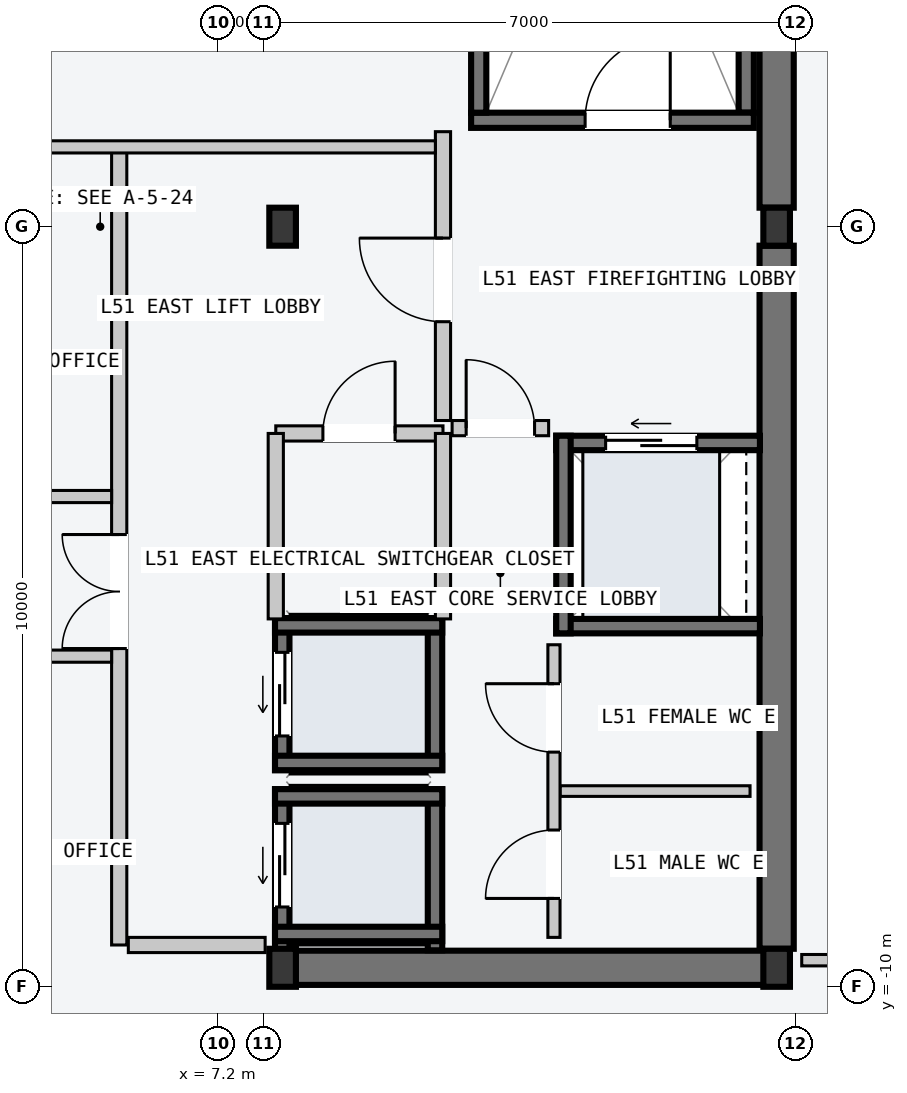
"""IFC4 building model, lengths in metres.
Left out: names, types, materials, properties, quantities, classifications, styles, units other than length and angle.
Written with IfcOpenShell. Run it as: python <this file> out.ifc"""

import sys

from ifc_helpers import new_model, si_unit, direction, frame, frame_2d, origin, origin_2d, place, context, subcontext, project, spatial, rectangle, i_section, extrude, element, fill, save


model = new_model("IFC4")
c1 = context("Model", 3, precision=1e-05, world=origin(), true_north=direction((0.0, 1.0)))
c2 = subcontext(c1, "Body", "Model", "MODEL_VIEW")
j1 = project(units=[si_unit("LENGTHUNIT", "METRE"), si_unit("PLANEANGLEUNIT", "RADIAN")], contexts=[c1])
p1 = place(None, origin())
s1 = spatial("IfcSite", under=j1, at=p1, CompositionType="ELEMENT")
p2 = place(p1, origin())
s2 = spatial("IfcBuilding", under=s1, at=p2, CompositionType="ELEMENT")
p3 = place(p2, frame((0.0, 0.0, 194.7)))
s3 = spatial("IfcBuildingStorey", under=s2, at=p3, CompositionType="ELEMENT", Elevation=194.7)
p4 = place(p3, frame((8.07, -9.75, -0.2), z_axis=(0.0, 0.0, 1.0), x_axis=(1.0, 0.0, 0.0)))
e1 = element("IfcWall", 1, at=p4, inside=s3, PredefinedType="SHEAR", context=c2, shape_type="SweptSolid", body=[
    extrude(rectangle(XDim=6.46, YDim=0.45, at=frame_2d((3.23, 0.0))), origin(), (0.0, 0.0, 1.0), 3.6),
])
for number, where, z_axis, x_axis in (
    (2, (14.55, -9.5, -0.2), (0.0, 0.0, 1.0), (0.0, 1.0, 0.0)),
    (3, (14.55, 0.25, -0.2), (0.0, 0.0, 1.0), (0.0, 1.0, 0.0)),
):
    element("IfcWall", number, at=place(p3, frame(where, z_axis=z_axis, x_axis=x_axis)), inside=s3, PredefinedType="SHEAR", context=c2, shape_type="SweptSolid", body=[
        extrude(rectangle(XDim=9.25, YDim=0.45, at=frame_2d((4.625, 0.0))), origin(), (0.0, 0.0, 1.0), 3.6),
    ])
p5 = place(p3, frame((14.15, 1.5, -0.2), z_axis=(0.0, 0.0, 1.0), x_axis=(0.0, 1.0, 0.0)))
e4 = element("IfcWall", 4, at=p5, inside=s3, PredefinedType="SOLIDWALL", context=c2, shape_type="SweptSolid", body=[
    extrude(rectangle(XDim=7.8, YDim=0.2, at=frame_2d((3.9, 0.0))), origin(), (0.0, 0.0, 1.0), 3.6),
])
p6 = place(p3, frame((10.53, 1.4, -0.2), z_axis=(0.0, 0.0, 1.0), x_axis=(1.0, 0.0, 0.0)))
e5 = element("IfcWall", 5, at=p6, inside=s3, PredefinedType="SOLIDWALL", context=c2, shape_type="SweptSolid", body=[
    extrude(rectangle(XDim=3.72, YDim=0.2, at=frame_2d((1.86, 0.0))), origin(), (0.0, 0.0, 1.0), 3.6),
])
p7 = place(p6, frame((1.5, 0.0, 0.2)))
e6 = element("IfcOpeningElement", 6, at=p7, cuts=e5, PredefinedType="OPENING", context=c2, shape_type="SweptSolid", body=[
    extrude(rectangle(XDim=1.12, YDim=2.18, at=frame_2d((0.56, 1.09))), frame((0.0, 0.11, 0.0), z_axis=(0.0, -1.0, 0.0), x_axis=(1.0, 0.0, 0.0)), (0.0, 0.0, 1.0), 0.22),
])
p8 = place(p3, frame((10.63, 1.5, -0.2), z_axis=(0.0, 0.0, 1.0), x_axis=(0.0, 1.0, 0.0)))
e7 = element("IfcWall", 7, at=p8, inside=s3, PredefinedType="SOLIDWALL", context=c2, shape_type="SweptSolid", body=[
    extrude(rectangle(XDim=7.8, YDim=0.2, at=frame_2d((3.9, 0.0))), origin(), (0.0, 0.0, 1.0), 3.6),
])
for number, where, z_axis, x_axis in (
    (8, (8.05, -9.75, 0.0), (0.0, 0.0, 1.0), (1.0, 0.0, 0.0)),
    (9, (8.05, 0.0, 0.0), (0.0, 0.0, 1.0), (1.0, 0.0, 0.0)),
    (10, (14.55, -9.75, 0.0), (0.0, 0.0, 1.0), (1.0, 0.0, 0.0)),
    (11, (14.55, 0.0, 0.0), (0.0, 0.0, 1.0), (1.0, 0.0, 0.0)),
):
    element("IfcColumn", number, at=place(p3, frame(where, z_axis=z_axis, x_axis=x_axis)), inside=s3, PredefinedType="COLUMN", context=c2, shape_type="SweptSolid", body=[
        extrude(i_section(OverallWidth=0.35, OverallDepth=0.5, WebThickness=0.02, FlangeThickness=0.032, at=origin_2d()), origin(), (0.0, 0.0, 1.0), 3.6),
    ])
p9 = place(p3, frame((8.045, -9.52, -0.2), z_axis=(0.0, 0.0, 1.0), x_axis=(0.0, 1.0, 0.0)))
e12 = element("IfcWall", 12, at=p9, inside=s3, PredefinedType="SOLIDWALL", context=c2, shape_type="SweptSolid", body=[
    extrude(rectangle(XDim=2.12, YDim=0.19, at=frame_2d((1.06, 0.0))), origin(), (0.0, 0.0, 1.0), 3.6),
])
p10 = place(p9, frame((0.57, 0.0, 0.2)))
e13 = element("IfcOpeningElement", 13, at=p10, cuts=e12, PredefinedType="OPENING", context=c2, shape_type="SweptSolid", body=[
    extrude(rectangle(XDim=1.1, YDim=2.2, at=frame_2d((0.55, 1.1))), frame((0.0, 0.105, 0.0), z_axis=(0.0, -1.0, 0.0), x_axis=(1.0, 0.0, 0.0)), (0.0, 0.0, 1.0), 0.21),
])
p11 = place(p3, frame((10.055, -9.52, -0.2), z_axis=(0.0, 0.0, 1.0), x_axis=(0.0, 1.0, 0.0)))
e14 = element("IfcWall", 14, at=p11, inside=s3, PredefinedType="SOLIDWALL", context=c2, shape_type="SweptSolid", body=[
    extrude(rectangle(XDim=2.12, YDim=0.19, at=frame_2d((1.06, 0.0))), origin(), (0.0, 0.0, 1.0), 3.6),
])
for number, where, z_axis, x_axis in (
    (15, (7.95, -7.495, -0.2), (0.0, 0.0, 1.0), (1.0, 0.0, 0.0)),
    (16, (7.95, -9.305, -0.2), (0.0, 0.0, 1.0), (1.0, 0.0, 0.0)),
):
    element("IfcWall", number, at=place(p3, frame(where, z_axis=z_axis, x_axis=x_axis)), inside=s3, PredefinedType="SOLIDWALL", context=c2, shape_type="SweptSolid", body=[
        extrude(rectangle(XDim=2.2, YDim=0.19, at=frame_2d((1.1, 0.0))), origin(), (0.0, 0.0, 1.0), 3.6),
    ])
p12 = place(p3, frame((8.045, -7.15, -0.2), z_axis=(0.0, 0.0, 1.0), x_axis=(0.0, 1.0, 0.0)))
e17 = element("IfcWall", 17, at=p12, inside=s3, PredefinedType="SOLIDWALL", context=c2, shape_type="SweptSolid", body=[
    extrude(rectangle(XDim=2.0, YDim=0.19, at=frame_2d((1.0, 0.0))), origin(), (0.0, 0.0, 1.0), 3.6),
])
p13 = place(p12, frame((0.45, 0.0, 0.2)))
e18 = element("IfcOpeningElement", 18, at=p13, cuts=e17, PredefinedType="OPENING", context=c2, shape_type="SweptSolid", body=[
    extrude(rectangle(XDim=1.1, YDim=2.2, at=frame_2d((0.55, 1.1))), frame((0.0, 0.105, 0.0), z_axis=(0.0, -1.0, 0.0), x_axis=(1.0, 0.0, 0.0)), (0.0, 0.0, 1.0), 0.21),
])
p14 = place(p3, frame((10.055, -7.15, -0.2), z_axis=(0.0, 0.0, 1.0), x_axis=(0.0, 1.0, 0.0)))
e19 = element("IfcWall", 19, at=p14, inside=s3, PredefinedType="SOLIDWALL", context=c2, shape_type="SweptSolid", body=[
    extrude(rectangle(XDim=2.0, YDim=0.19, at=frame_2d((1.0, 0.0))), origin(), (0.0, 0.0, 1.0), 3.6),
])
for number, where, z_axis, x_axis in (
    (20, (7.95, -5.245, -0.2), (0.0, 0.0, 1.0), (1.0, 0.0, 0.0)),
    (21, (7.95, -7.055, -0.2), (0.0, 0.0, 1.0), (1.0, 0.0, 0.0)),
):
    element("IfcWall", number, at=place(p3, frame(where, z_axis=z_axis, x_axis=x_axis)), inside=s3, PredefinedType="SOLIDWALL", context=c2, shape_type="SweptSolid", body=[
        extrude(rectangle(XDim=2.2, YDim=0.19, at=frame_2d((1.1, 0.0))), origin(), (0.0, 0.0, 1.0), 3.6),
    ])
p15 = place(p3, frame((11.65, -2.845, -0.2), z_axis=(0.0, 0.0, 1.0), x_axis=(1.0, 0.0, 0.0)))
e22 = element("IfcWall", 22, at=p15, inside=s3, PredefinedType="SOLIDWALL", context=c2, shape_type="SweptSolid", body=[
    extrude(rectangle(XDim=2.68, YDim=0.19, at=frame_2d((1.34, 0.0))), origin(), (0.0, 0.0, 1.0), 3.6),
])
p16 = place(p15, frame((0.65, 0.0, 0.2)))
e23 = element("IfcOpeningElement", 23, at=p16, cuts=e22, PredefinedType="OPENING", context=c2, shape_type="SweptSolid", body=[
    extrude(rectangle(XDim=1.2, YDim=2.2, at=frame_2d((0.6, 1.1))), frame((0.0, 0.105, 0.0), z_axis=(0.0, -1.0, 0.0), x_axis=(1.0, 0.0, 0.0)), (0.0, 0.0, 1.0), 0.21),
])
p17 = place(p3, frame((11.65, -5.255, -0.2), z_axis=(0.0, 0.0, 1.0), x_axis=(1.0, 0.0, 0.0)))
e24 = element("IfcWall", 24, at=p17, inside=s3, PredefinedType="SOLIDWALL", context=c2, shape_type="SweptSolid", body=[
    extrude(rectangle(XDim=2.68, YDim=0.19, at=frame_2d((1.34, 0.0))), origin(), (0.0, 0.0, 1.0), 3.6),
])
p18 = place(p3, frame((11.745, -5.35, -0.2), z_axis=(0.0, 0.0, 1.0), x_axis=(0.0, 1.0, 0.0)))
e25 = element("IfcWall", 25, at=p18, inside=s3, PredefinedType="SOLIDWALL", context=c2, shape_type="SweptSolid", body=[
    extrude(rectangle(XDim=2.6, YDim=0.19, at=frame_2d((1.3, 0.0))), origin(), (0.0, 0.0, 1.0), 3.6),
])
p19 = place(p3, frame((5.9, -9.45, 0.0), z_axis=(0.0, 0.0, 1.0), x_axis=(0.0, 1.0, 0.0)))
e26 = element("IfcWall", 26, at=p19, inside=s3, PredefinedType="PARTITIONING", context=c2, shape_type="SweptSolid", body=[
    extrude(rectangle(XDim=10.5, YDim=0.2, at=frame_2d((5.25, 0.0))), origin(), (0.0, 0.0, 1.0), 3.4),
])
p20 = place(p19, frame((3.9, 0.0, 0.0)))
e27 = element("IfcOpeningElement", 27, at=p20, cuts=e26, PredefinedType="OPENING", context=c2, shape_type="SweptSolid", body=[
    extrude(rectangle(XDim=1.5, YDim=2.2, at=frame_2d((0.75, 1.1))), frame((0.0, 0.11, 0.0), z_axis=(0.0, -1.0, 0.0), x_axis=(1.0, 0.0, 0.0)), (0.0, 0.0, 1.0), 0.22),
])
p21 = place(p3, frame((6.02, -9.45, 0.0), z_axis=(0.0, 0.0, 1.0), x_axis=(1.0, 0.0, 0.0)))
e28 = element("IfcWall", 28, at=p21, inside=s3, PredefinedType="PARTITIONING", context=c2, shape_type="SweptSolid", body=[
    extrude(rectangle(XDim=1.8, YDim=0.2, at=frame_2d((0.9, 0.0))), origin(), (0.0, 0.0, 1.0), 3.4),
])
p22 = place(p3, frame((10.16, -2.55, 0.0), z_axis=(0.0, 0.0, 1.0), x_axis=(0.0, 1.0, 0.0)))
e29 = element("IfcWall", 29, at=p22, inside=s3, PredefinedType="PARTITIONING", context=c2, shape_type="SweptSolid", body=[
    extrude(rectangle(XDim=3.8, YDim=0.2, at=frame_2d((1.9, 0.0))), origin(), (0.0, 0.0, 1.0), 3.4),
])
p23 = place(p22, frame((1.3, 0.0, 0.0)))
e30 = element("IfcOpeningElement", 30, at=p23, cuts=e29, PredefinedType="OPENING", context=c2, shape_type="SweptSolid", body=[
    extrude(rectangle(XDim=1.1, YDim=2.15, at=frame_2d((0.55, 1.075))), frame((0.0, 0.11, 0.0), z_axis=(0.0, -1.0, 0.0), x_axis=(1.0, 0.0, 0.0)), (0.0, 0.0, 1.0), 0.22),
])
p24 = place(p3, frame((10.28, -2.65, 0.0), z_axis=(0.0, 0.0, 1.0), x_axis=(1.0, 0.0, 0.0)))
e31 = element("IfcWall", 31, at=p24, inside=s3, PredefinedType="PARTITIONING", context=c2, shape_type="SweptSolid", body=[
    extrude(rectangle(XDim=1.27, YDim=0.2, at=frame_2d((0.635, 0.0))), origin(), (0.0, 0.0, 1.0), 3.4),
])
p25 = place(p24, frame((0.185, 0.0, 0.0)))
e32 = element("IfcOpeningElement", 32, at=p25, cuts=e31, PredefinedType="OPENING", context=c2, shape_type="SweptSolid", body=[
    extrude(rectangle(XDim=0.9, YDim=2.15, at=frame_2d((0.45, 1.075))), frame((0.0, 0.11, 0.0), z_axis=(0.0, -1.0, 0.0), x_axis=(1.0, 0.0, 0.0)), (0.0, 0.0, 1.0), 0.22),
])
p26 = place(p3, frame((7.96, -2.72, 0.0), z_axis=(0.0, 0.0, 1.0), x_axis=(1.0, 0.0, 0.0)))
e33 = element("IfcWall", 33, at=p26, inside=s3, PredefinedType="PARTITIONING", context=c2, shape_type="SweptSolid", body=[
    extrude(rectangle(XDim=2.2, YDim=0.2, at=frame_2d((1.1, 0.0))), origin(), (0.0, 0.0, 1.0), 3.4),
])
p27 = place(p26, frame((0.62, 0.0, 0.0)))
e34 = element("IfcOpeningElement", 34, at=p27, cuts=e33, PredefinedType="OPENING", context=c2, shape_type="SweptSolid", body=[
    extrude(rectangle(XDim=0.95, YDim=2.1, at=frame_2d((0.475, 1.05))), frame((0.0, 0.11, 0.0), z_axis=(0.0, -1.0, 0.0), x_axis=(1.0, 0.0, 0.0)), (0.0, 0.0, 1.0), 0.22),
])
for number, where, z_axis, x_axis in (
    (35, (7.96, -5.16, 0.0), (0.0, 0.0, 1.0), (0.0, 1.0, 0.0)),
    (36, (10.16, -5.16, 0.0), (0.0, 0.0, 1.0), (0.0, 1.0, 0.0)),
):
    element("IfcWall", number, at=place(p3, frame(where, z_axis=z_axis, x_axis=x_axis)), inside=s3, PredefinedType="PARTITIONING", context=c2, shape_type="SweptSolid", body=[
        extrude(rectangle(XDim=2.44, YDim=0.2, at=frame_2d((1.22, 0.0))), origin(), (0.0, 0.0, 1.0), 3.4),
    ])
p28 = place(p3, frame((11.7, -7.425, 0.0), z_axis=(0.0, 0.0, 1.0), x_axis=(1.0, 0.0, 0.0)))
e37 = element("IfcWall", 37, at=p28, inside=s3, PredefinedType="PARTITIONING", context=c2, shape_type="SweptSolid", body=[
    extrude(rectangle(XDim=2.5, YDim=0.14, at=frame_2d((1.25, 0.0))), origin(), (0.0, 0.0, 1.0), 3.4),
])
p29 = place(p3, frame((11.62, -9.35, 0.0), z_axis=(0.0, 0.0, 1.0), x_axis=(0.0, 1.0, 0.0)))
e38 = element("IfcWall", 38, at=p29, inside=s3, PredefinedType="PARTITIONING", context=c2, shape_type="SweptSolid", body=[
    extrude(rectangle(XDim=3.85, YDim=0.16, at=frame_2d((1.925, 0.0))), origin(), (0.0, 0.0, 1.0), 3.4),
])
p30 = place(p29, frame((0.512, 0.0, 0.0)))
e39 = element("IfcOpeningElement", 39, at=p30, cuts=e38, PredefinedType="OPENING", context=c2, shape_type="SweptSolid", body=[
    extrude(rectangle(XDim=0.9, YDim=2.15, at=frame_2d((0.45, 1.075))), frame((0.0, 0.09, 0.0), z_axis=(0.0, -1.0, 0.0), x_axis=(1.0, 0.0, 0.0)), (0.0, 0.0, 1.0), 0.18),
])
p31 = place(p29, frame((2.438, 0.0, 0.0)))
e40 = element("IfcOpeningElement", 40, at=p31, cuts=e38, PredefinedType="OPENING", context=c2, shape_type="SweptSolid", body=[
    extrude(rectangle(XDim=0.9, YDim=2.15, at=frame_2d((0.45, 1.075))), frame((0.0, 0.09, 0.0), z_axis=(0.0, -1.0, 0.0), x_axis=(1.0, 0.0, 0.0)), (0.0, 0.0, 1.0), 0.18),
])
p32 = place(p3, frame((1.26, 1.05, 0.0), z_axis=(0.0, 0.0, 1.0), x_axis=(1.0, 0.0, 0.0)))
e41 = element("IfcWall", 41, at=p32, inside=s3, PredefinedType="PARTITIONING", context=c2, shape_type="SweptSolid", body=[
    extrude(rectangle(XDim=8.8, YDim=0.16, at=frame_2d((4.4, 0.0))), origin(), (0.0, 0.0, 1.0), 3.4),
])
for number, where, z_axis, x_axis in (
    (42, (1.26, -3.55, 0.0), (0.0, 0.0, 1.0), (1.0, 0.0, 0.0)),
    (43, (1.26, -5.65, 0.0), (0.0, 0.0, 1.0), (1.0, 0.0, 0.0)),
):
    element("IfcWall", number, at=place(p3, frame(where, z_axis=z_axis, x_axis=x_axis)), inside=s3, PredefinedType="PARTITIONING", context=c2, shape_type="SweptSolid", body=[
        extrude(rectangle(XDim=4.54, YDim=0.16, at=frame_2d((2.27, 0.0))), origin(), (0.0, 0.0, 1.0), 3.4),
    ])
p33 = place(p3, frame((14.88, -9.65, 0.0), z_axis=(0.0, 0.0, 1.0), x_axis=(1.0, 0.0, 0.0)))
e44 = element("IfcWall", 44, at=p33, inside=s3, PredefinedType="PARTITIONING", context=c2, shape_type="SweptSolid", body=[
    extrude(rectangle(XDim=5.68, YDim=0.15, at=frame_2d((2.84, 0.0))), origin(), (0.0, 0.0, 1.0), 2.75),
])
p34 = place(p33, frame((2.36, 0.0, 0.0)))
e45 = element("IfcOpeningElement", 45, at=p34, cuts=e44, PredefinedType="OPENING", context=c2, shape_type="SweptSolid", body=[
    extrude(rectangle(XDim=0.96, YDim=2.18, at=frame_2d((0.48, 1.09))), frame((0.0, 0.085, 0.0), z_axis=(0.0, -1.0, 0.0), x_axis=(1.0, 0.0, 0.0)), (0.0, 0.0, 1.0), 0.17),
])
p35 = place(p7, origin())
e46 = element("IfcDoor", 46, at=p35, inside=s3, OperationType="SINGLE_SWING_RIGHT", PredefinedType="DOOR", context=c2, shape_type="SweptSolid", body=[
    extrude(rectangle(XDim=1.12, YDim=2.18, at=frame_2d((0.56, 1.09))), frame((0.0, 0.025, 0.0), z_axis=(0.0, -1.0, 0.0), x_axis=(1.0, 0.0, 0.0)), (0.0, 0.0, 1.0), 0.05),
])
fill(e6, e46)
p36 = place(p10, origin())
e47 = element("IfcDoor", 47, at=p36, inside=s3, OperationType="SLIDING_TO_LEFT", PredefinedType="DOOR", context=c2, shape_type="SweptSolid", body=[
    extrude(rectangle(XDim=1.1, YDim=2.2, at=frame_2d((0.55, 1.1))), frame((0.0, 0.025, 0.0), z_axis=(0.0, -1.0, 0.0), x_axis=(1.0, 0.0, 0.0)), (0.0, 0.0, 1.0), 0.05),
])
fill(e13, e47)
p37 = place(p13, origin())
e48 = element("IfcDoor", 48, at=p37, inside=s3, OperationType="SLIDING_TO_LEFT", PredefinedType="DOOR", context=c2, shape_type="SweptSolid", body=[
    extrude(rectangle(XDim=1.1, YDim=2.2, at=frame_2d((0.55, 1.1))), frame((0.0, 0.025, 0.0), z_axis=(0.0, -1.0, 0.0), x_axis=(1.0, 0.0, 0.0)), (0.0, 0.0, 1.0), 0.05),
])
fill(e18, e48)
p38 = place(p16, origin())
e49 = element("IfcDoor", 49, at=p38, inside=s3, OperationType="SLIDING_TO_LEFT", PredefinedType="DOOR", context=c2, shape_type="SweptSolid", body=[
    extrude(rectangle(XDim=1.2, YDim=2.2, at=frame_2d((0.6, 1.1))), frame((0.0, 0.025, 0.0), z_axis=(0.0, -1.0, 0.0), x_axis=(1.0, 0.0, 0.0)), (0.0, 0.0, 1.0), 0.05),
])
fill(e23, e49)
p39 = place(p20, origin())
e50 = element("IfcDoor", 50, at=p39, inside=s3, OperationType="DOUBLE_DOOR_SINGLE_SWING", PredefinedType="DOOR", context=c2, shape_type="SweptSolid", body=[
    extrude(rectangle(XDim=1.5, YDim=2.2, at=frame_2d((0.75, 1.1))), frame((0.0, 0.025, 0.0), z_axis=(0.0, -1.0, 0.0), x_axis=(1.0, 0.0, 0.0)), (0.0, 0.0, 1.0), 0.05),
])
fill(e27, e50)
p40 = place(p23, origin())
e51 = element("IfcDoor", 51, at=p40, inside=s3, OperationType="SINGLE_SWING_RIGHT", PredefinedType="DOOR", context=c2, shape_type="SweptSolid", body=[
    extrude(rectangle(XDim=1.1, YDim=2.15, at=frame_2d((0.55, 1.075))), frame((0.0, 0.025, 0.0), z_axis=(0.0, -1.0, 0.0), x_axis=(1.0, 0.0, 0.0)), (0.0, 0.0, 1.0), 0.05),
])
fill(e30, e51)
p41 = place(p25, origin())
e52 = element("IfcDoor", 52, at=p41, inside=s3, OperationType="SINGLE_SWING_LEFT", PredefinedType="DOOR", context=c2, shape_type="SweptSolid", body=[
    extrude(rectangle(XDim=0.9, YDim=2.15, at=frame_2d((0.45, 1.075))), frame((0.0, 0.025, 0.0), z_axis=(0.0, -1.0, 0.0), x_axis=(1.0, 0.0, 0.0)), (0.0, 0.0, 1.0), 0.05),
])
fill(e32, e52)
p42 = place(p27, origin())
e53 = element("IfcDoor", 53, at=p42, inside=s3, OperationType="SINGLE_SWING_RIGHT", PredefinedType="DOOR", context=c2, shape_type="SweptSolid", body=[
    extrude(rectangle(XDim=0.95, YDim=2.1, at=frame_2d((0.475, 1.05))), frame((0.0, 0.025, 0.0), z_axis=(0.0, -1.0, 0.0), x_axis=(1.0, 0.0, 0.0)), (0.0, 0.0, 1.0), 0.05),
])
fill(e34, e53)
p43 = place(p30, origin())
e54 = element("IfcDoor", 54, at=p43, inside=s3, OperationType="SINGLE_SWING_LEFT", PredefinedType="DOOR", context=c2, shape_type="SweptSolid", body=[
    extrude(rectangle(XDim=0.9, YDim=2.15, at=frame_2d((0.45, 1.075))), frame((0.0, 0.025, 0.0), z_axis=(0.0, -1.0, 0.0), x_axis=(1.0, 0.0, 0.0)), (0.0, 0.0, 1.0), 0.05),
])
fill(e39, e54)
p44 = place(p31, origin())
e55 = element("IfcDoor", 55, at=p44, inside=s3, OperationType="SINGLE_SWING_RIGHT", PredefinedType="DOOR", context=c2, shape_type="SweptSolid", body=[
    extrude(rectangle(XDim=0.9, YDim=2.15, at=frame_2d((0.45, 1.075))), frame((0.0, 0.025, 0.0), z_axis=(0.0, -1.0, 0.0), x_axis=(1.0, 0.0, 0.0)), (0.0, 0.0, 1.0), 0.05),
])
fill(e40, e55)
save(model, sys.argv[1])
